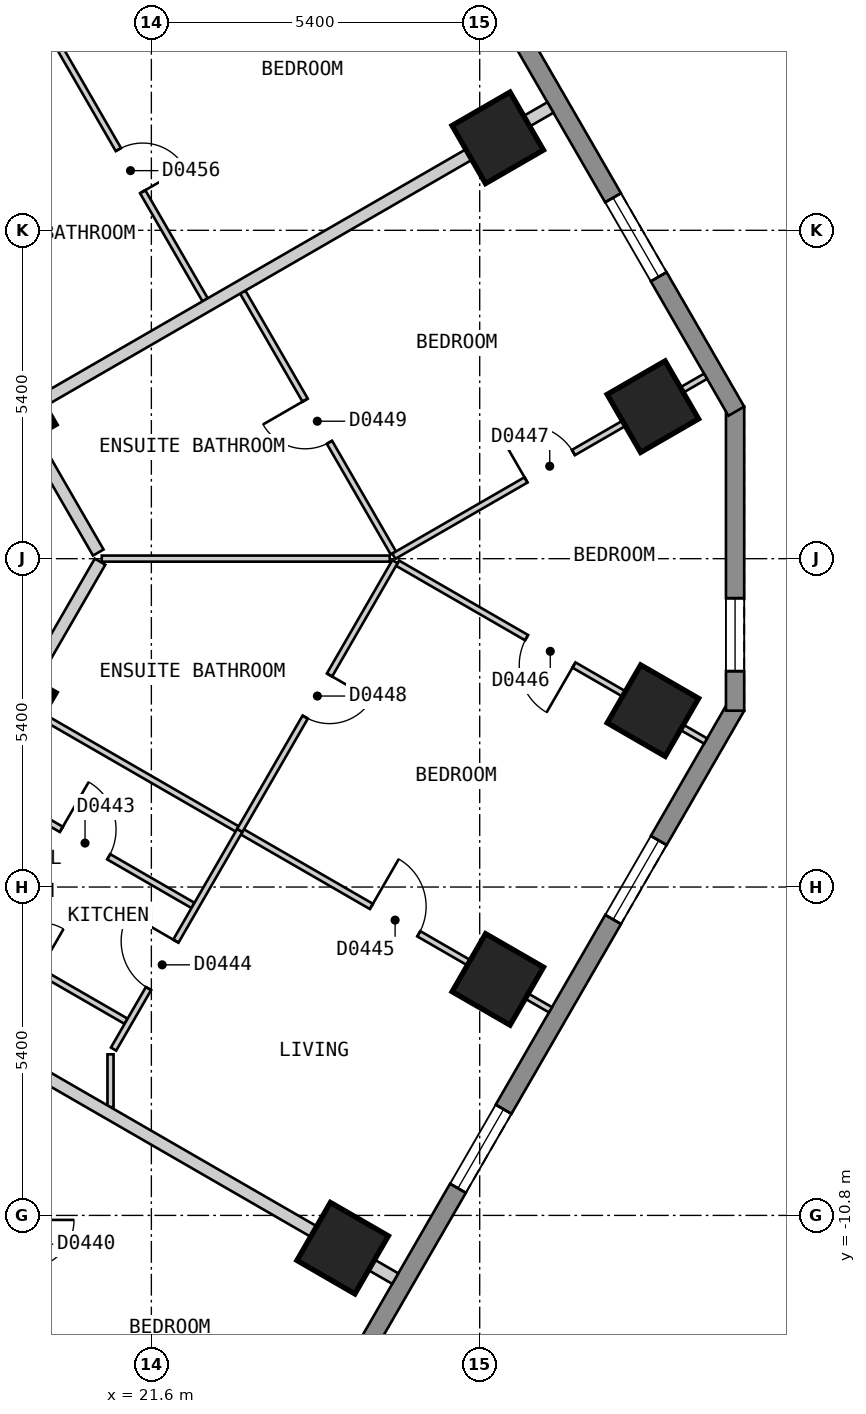
"""IFC4 building model, lengths in metres.
Left out: names, types, materials, properties, quantities, classifications, styles, units other than length and angle.
Written with IfcOpenShell. Run it as: python <this file> out.ifc"""

import sys

from ifc_helpers import new_model, si_unit, direction, frame, frame_2d, origin, origin_2d, place, context, subcontext, project, spatial, polyline, rectangle, outline, extrude, element, fill, save


model = new_model("IFC4")
c1 = context("Model", 3, precision=1e-05, world=origin(), true_north=direction((0.0, 1.0)))
c2 = subcontext(c1, "Body", "Model", "MODEL_VIEW")
j1 = project(units=[si_unit("LENGTHUNIT", "METRE"), si_unit("PLANEANGLEUNIT", "RADIAN")], contexts=[c1])
p1 = place(None, origin())
s1 = spatial("IfcSite", under=j1, at=p1, CompositionType="ELEMENT")
p2 = place(p1, origin())
s2 = spatial("IfcBuilding", under=s1, at=p2, CompositionType="ELEMENT")
p3 = place(p2, frame((0.0, 0.0, 32.4)))
s3 = spatial("IfcBuildingStorey", under=s2, at=p3, CompositionType="ELEMENT", Elevation=32.4)
for number, where, z_axis, x_axis in (
    (1, (24.746, -11.339, 0.0), (0.0, 0.0, 1.0), (0.5, 0.866, 0.0)),
    (2, (27.298, -6.919, 0.0), (0.0, 0.0, 1.0), (0.5, 0.866, 0.0)),
    (3, (29.849, -2.499, 0.0), (0.0, 0.0, 1.0), (0.5, 0.866, 0.0)),
    (4, (29.848, 2.5, 0.0), (0.0, 0.0, 1.0), (-0.5, 0.866, 0.0)),
    (5, (27.297, 6.921, 0.0), (0.0, 0.0, 1.0), (-0.5, 0.866, 0.0)),
):
    element("IfcColumn", number, at=place(p3, frame(where, z_axis=z_axis, x_axis=x_axis)), inside=s3, PredefinedType="COLUMN", context=c2, shape_type="SweptSolid", body=[
        extrude(rectangle(XDim=1.1, YDim=1.1, at=origin_2d()), origin(), (0.0, 0.0, 1.0), 3.0),
    ])
for number, where, z_axis, x_axis in (
    (6, (19.417, -2.369, 0.0), (0.0, 0.0, 1.0), (0.5, 0.866, 0.0)),
    (7, (19.416, 2.371, 0.0), (0.0, 0.0, 1.0), (-0.5, 0.866, 0.0)),
):
    element("IfcColumn", number, at=place(p3, frame(where, z_axis=z_axis, x_axis=x_axis)), inside=s3, PredefinedType="COLUMN", context=c2, shape_type="SweptSolid", body=[
        extrude(rectangle(XDim=0.9, YDim=0.9, at=origin_2d()), origin(), (0.0, 0.0, 1.0), 3.0),
    ])
p4 = place(p3, frame((17.71, -25.825, 0.0), z_axis=(0.0, 0.0, 1.0), x_axis=(0.500001938803, 0.866024284413, 0.0)))
e8 = element("IfcWall", 8, at=p4, inside=s3, PredefinedType="SOLIDWALL", context=c2, shape_type="SweptSolid", body=[
    extrude(outline(polyline([(0.0, -0.15), (27.02, -0.15), (26.94, 0.15), (0.08, 0.15), (0.0, -0.15)])), origin(), (0.0, 0.0, 1.0), 2.7),
])
p5 = place(p4, frame((2.553, 0.0, 0.15)))
e9 = element("IfcOpeningElement", 9, at=p5, cuts=e8, PredefinedType="OPENING", context=c2, shape_type="SweptSolid", body=[
    extrude(rectangle(XDim=1.5, YDim=2.1, at=frame_2d((0.75, 1.05))), frame((0.0, 0.16, 0.0), z_axis=(0.0, -1.0, 0.0), x_axis=(1.0, 0.0, 0.0)), (0.0, 0.0, 1.0), 0.32),
])
p6 = place(p4, frame((7.658, 0.0, 0.15)))
e10 = element("IfcOpeningElement", 10, at=p6, cuts=e8, PredefinedType="OPENING", context=c2, shape_type="SweptSolid", body=[
    extrude(rectangle(XDim=1.5, YDim=2.1, at=frame_2d((0.75, 1.05))), frame((0.0, 0.16, 0.0), z_axis=(0.0, -1.0, 0.0), x_axis=(1.0, 0.0, 0.0)), (0.0, 0.0, 1.0), 0.32),
])
p7 = place(p4, frame((12.761, 0.0, 0.15)))
e11 = element("IfcOpeningElement", 11, at=p7, cuts=e8, PredefinedType="OPENING", context=c2, shape_type="SweptSolid", body=[
    extrude(rectangle(XDim=1.5, YDim=2.1, at=frame_2d((0.75, 1.05))), frame((0.0, 0.16, 0.0), z_axis=(0.0, -1.0, 0.0), x_axis=(1.0, 0.0, 0.0)), (0.0, 0.0, 1.0), 0.32),
])
p8 = place(p4, frame((17.865, 0.0, 0.15)))
e12 = element("IfcOpeningElement", 12, at=p8, cuts=e8, PredefinedType="OPENING", context=c2, shape_type="SweptSolid", body=[
    extrude(rectangle(XDim=1.5, YDim=2.1, at=frame_2d((0.75, 1.05))), frame((0.0, 0.16, 0.0), z_axis=(0.0, -1.0, 0.0), x_axis=(1.0, 0.0, 0.0)), (0.0, 0.0, 1.0), 0.32),
])
p9 = place(p4, frame((22.969, 0.0, 0.15)))
e13 = element("IfcOpeningElement", 13, at=p9, cuts=e8, PredefinedType="OPENING", context=c2, shape_type="SweptSolid", body=[
    extrude(rectangle(XDim=1.5, YDim=2.1, at=frame_2d((0.75, 1.05))), frame((0.0, 0.16, 0.0), z_axis=(0.0, -1.0, 0.0), x_axis=(1.0, 0.0, 0.0)), (0.0, 0.0, 1.0), 0.32),
])
p10 = place(p3, frame((31.2, -2.5, 0.0), z_axis=(0.0, 0.0, 1.0), x_axis=(0.0, 1.0, 0.0)))
e14 = element("IfcWall", 14, at=p10, inside=s3, PredefinedType="SOLIDWALL", context=c2, shape_type="SweptSolid", body=[
    extrude(outline(polyline([(0.0, -0.15), (5.0, -0.15), (4.92, 0.15), (0.08, 0.15), (0.0, -0.15)])), origin(), (0.0, 0.0, 1.0), 2.7),
])
p11 = place(p10, frame((0.65, 0.0, 0.15)))
e15 = element("IfcOpeningElement", 15, at=p11, cuts=e14, PredefinedType="OPENING", context=c2, shape_type="SweptSolid", body=[
    extrude(rectangle(XDim=1.2, YDim=2.1, at=frame_2d((0.6, 1.05))), frame((0.0, 0.16, 0.0), z_axis=(0.0, -1.0, 0.0), x_axis=(1.0, 0.0, 0.0)), (0.0, 0.0, 1.0), 0.32),
])
p12 = place(p3, frame((31.22, 2.425, 0.0), z_axis=(0.0, 0.0, 1.0), x_axis=(-0.500001938803, 0.866024284413, 0.0)))
e16 = element("IfcWall", 16, at=p12, inside=s3, PredefinedType="SOLIDWALL", context=c2, shape_type="SweptSolid", body=[
    extrude(outline(polyline([(0.0, -0.15), (27.02, -0.15), (26.94, 0.15), (0.08, 0.15), (0.0, -0.15)])), origin(), (0.0, 0.0, 1.0), 2.7),
])
p13 = place(p12, frame((2.553, 0.0, 0.15)))
e17 = element("IfcOpeningElement", 17, at=p13, cuts=e16, PredefinedType="OPENING", context=c2, shape_type="SweptSolid", body=[
    extrude(rectangle(XDim=1.5, YDim=2.1, at=frame_2d((0.75, 1.05))), frame((0.0, 0.16, 0.0), z_axis=(0.0, -1.0, 0.0), x_axis=(1.0, 0.0, 0.0)), (0.0, 0.0, 1.0), 0.32),
])
p14 = place(p12, frame((7.657, 0.0, 0.15)))
e18 = element("IfcOpeningElement", 18, at=p14, cuts=e16, PredefinedType="OPENING", context=c2, shape_type="SweptSolid", body=[
    extrude(rectangle(XDim=1.5, YDim=2.1, at=frame_2d((0.75, 1.05))), frame((0.0, 0.16, 0.0), z_axis=(0.0, -1.0, 0.0), x_axis=(1.0, 0.0, 0.0)), (0.0, 0.0, 1.0), 0.32),
])
p15 = place(p12, frame((12.761, 0.0, 0.15)))
e19 = element("IfcOpeningElement", 19, at=p15, cuts=e16, PredefinedType="OPENING", context=c2, shape_type="SweptSolid", body=[
    extrude(rectangle(XDim=1.5, YDim=2.1, at=frame_2d((0.75, 1.05))), frame((0.0, 0.16, 0.0), z_axis=(0.0, -1.0, 0.0), x_axis=(1.0, 0.0, 0.0)), (0.0, 0.0, 1.0), 0.32),
])
p16 = place(p12, frame((17.865, 0.0, 0.15)))
e20 = element("IfcOpeningElement", 20, at=p16, cuts=e16, PredefinedType="OPENING", context=c2, shape_type="SweptSolid", body=[
    extrude(rectangle(XDim=1.5, YDim=2.1, at=frame_2d((0.75, 1.05))), frame((0.0, 0.16, 0.0), z_axis=(0.0, -1.0, 0.0), x_axis=(1.0, 0.0, 0.0)), (0.0, 0.0, 1.0), 0.32),
])
p17 = place(p12, frame((22.969, 0.0, 0.15)))
e21 = element("IfcOpeningElement", 21, at=p17, cuts=e16, PredefinedType="OPENING", context=c2, shape_type="SweptSolid", body=[
    extrude(rectangle(XDim=1.5, YDim=2.1, at=frame_2d((0.75, 1.05))), frame((0.0, 0.16, 0.0), z_axis=(0.0, -1.0, 0.0), x_axis=(1.0, 0.0, 0.0)), (0.0, 0.0, 1.0), 0.32),
])
p18 = place(p3, frame((10.45, 17.9, 0.0), z_axis=(0.0, 0.0, 1.0), x_axis=(0.500034352617, -0.866005569383, 0.0)))
e22 = element("IfcWall", 22, at=p18, inside=s3, PredefinedType="PARTITIONING", context=c2, shape_type="SweptSolid", body=[
    extrude(rectangle(XDim=20.553, YDim=0.2, at=frame_2d((10.276, 0.0))), origin(), (0.0, 0.0, 1.0), 2.7),
])
p19 = place(p18, frame((9.775, 0.0, 0.0)))
e23 = element("IfcOpeningElement", 23, at=p19, cuts=e22, PredefinedType="OPENING", context=c2, shape_type="SweptSolid", body=[
    extrude(rectangle(XDim=1.0, YDim=2.1, at=frame_2d((0.5, 1.05))), frame((0.0, 0.11, 0.0), z_axis=(0.0, -1.0, 0.0), x_axis=(1.0, 0.0, 0.0)), (0.0, 0.0, 1.0), 0.22),
])
p20 = place(p18, frame((0.852, 0.0, 0.0)))
e24 = element("IfcOpeningElement", 24, at=p20, cuts=e22, PredefinedType="OPENING", context=c2, shape_type="SweptSolid", body=[
    extrude(rectangle(XDim=0.8, YDim=2.1, at=frame_2d((0.4, 1.05))), frame((0.0, 0.11, 0.0), z_axis=(0.0, -1.0, 0.0), x_axis=(1.0, 0.0, 0.0)), (0.0, 0.0, 1.0), 0.22),
])
p21 = place(p3, frame((15.707, -8.794, 0.0), z_axis=(0.0, 0.0, 1.0), x_axis=(0.500016151272, 0.866016078642, 0.0)))
e25 = element("IfcWall", 25, at=p21, inside=s3, PredefinedType="PARTITIONING", context=c2, shape_type="SweptSolid", body=[
    extrude(rectangle(XDim=10.098, YDim=0.2, at=frame_2d((5.049, 0.0))), origin(), (0.0, 0.0, 1.0), 2.7),
])
p22 = place(p21, frame((4.367, 0.0, 0.0)))
e26 = element("IfcOpeningElement", 26, at=p22, cuts=e25, PredefinedType="OPENING", context=c2, shape_type="SweptSolid", body=[
    extrude(rectangle(XDim=1.0, YDim=2.1, at=frame_2d((0.5, 1.05))), frame((0.0, 0.11, 0.0), z_axis=(0.0, -1.0, 0.0), x_axis=(1.0, 0.0, 0.0)), (0.0, 0.0, 1.0), 0.22),
])
p23 = place(p3, frame((20.006, 8.548, 0.0), z_axis=(0.0, 0.0, 1.0), x_axis=(0.500055121407, -0.865993577086, 0.0)))
e27 = element("IfcWall", 27, at=p23, inside=s3, PredefinedType="PARTITIONING", context=c2, shape_type="SweptSolid", body=[
    extrude(rectangle(XDim=4.955, YDim=0.1, at=frame_2d((2.478, 0.0))), origin(), (0.0, 0.0, 1.0), 2.7),
])
p24 = place(p23, frame((2.102, 0.0, 0.0)))
e28 = element("IfcOpeningElement", 28, at=p24, cuts=e27, PredefinedType="OPENING", context=c2, shape_type="SweptSolid", body=[
    extrude(rectangle(XDim=0.8, YDim=2.1, at=frame_2d((0.4, 1.05))), frame((0.0, 0.06, 0.0), z_axis=(0.0, -1.0, 0.0), x_axis=(1.0, 0.0, 0.0)), (0.0, 0.0, 1.0), 0.12),
])
p25 = place(p3, frame((23.103, 4.384, 0.0), z_axis=(0.0, 0.0, 1.0), x_axis=(0.500029609304, -0.86600830817, 0.0)))
e29 = element("IfcWall", 29, at=p25, inside=s3, PredefinedType="PARTITIONING", context=c2, shape_type="SweptSolid", body=[
    extrude(rectangle(XDim=4.954, YDim=0.1, at=frame_2d((2.477, 0.0))), origin(), (0.0, 0.0, 1.0), 2.7),
])
p26 = place(p25, frame((2.052, 0.0, 0.0)))
e30 = element("IfcOpeningElement", 30, at=p26, cuts=e29, PredefinedType="OPENING", context=c2, shape_type="SweptSolid", body=[
    extrude(rectangle(XDim=0.8, YDim=2.1, at=frame_2d((0.4, 1.05))), frame((0.0, 0.06, 0.0), z_axis=(0.0, -1.0, 0.0), x_axis=(1.0, 0.0, 0.0)), (0.0, 0.0, 1.0), 0.12),
])
p27 = place(p3, frame((17.677, -5.582, 0.0), z_axis=(0.0, 0.0, 1.0), x_axis=(0.866015917575, -0.500016430238, 0.0)))
e31 = element("IfcWall", 31, at=p27, inside=s3, PredefinedType="PARTITIONING", context=c2, shape_type="SweptSolid", body=[
    extrude(rectangle(XDim=4.05, YDim=0.1, at=frame_2d((2.025, 0.0))), origin(), (0.0, 0.0, 1.0), 2.7),
])
p28 = place(p27, frame((1.6, 0.0, 0.0)))
e32 = element("IfcOpeningElement", 32, at=p28, cuts=e31, PredefinedType="OPENING", context=c2, shape_type="SweptSolid", body=[
    extrude(rectangle(XDim=0.8, YDim=2.1, at=frame_2d((0.4, 1.05))), frame((0.0, 0.06, 0.0), z_axis=(0.0, -1.0, 0.0), x_axis=(1.0, 0.0, 0.0)), (0.0, 0.0, 1.0), 0.12),
])
p29 = place(p3, frame((18.777, -3.677, 0.0), z_axis=(0.0, 0.0, 1.0), x_axis=(0.866000843773, -0.500042536776, 0.0)))
e33 = element("IfcWall", 33, at=p29, inside=s3, PredefinedType="PARTITIONING", context=c2, shape_type="SweptSolid", body=[
    extrude(rectangle(XDim=4.05, YDim=0.1, at=frame_2d((2.025, 0.0))), origin(), (0.0, 0.0, 1.0), 2.7),
])
p30 = place(p29, frame((1.55, 0.0, 0.0)))
e34 = element("IfcOpeningElement", 34, at=p30, cuts=e33, PredefinedType="OPENING", context=c2, shape_type="SweptSolid", body=[
    extrude(rectangle(XDim=0.9, YDim=2.1, at=frame_2d((0.45, 1.05))), frame((0.0, 0.06, 0.0), z_axis=(0.0, -1.0, 0.0), x_axis=(1.0, 0.0, 0.0)), (0.0, 0.0, 1.0), 0.12),
])
p31 = place(p3, frame((19.503, -2.419, 0.0), z_axis=(0.0, 0.0, 1.0), x_axis=(0.866047370643, -0.499961950354, 0.0)))
e35 = element("IfcWall", 35, at=p31, inside=s3, PredefinedType="PARTITIONING", context=c2, shape_type="SweptSolid", body=[
    extrude(rectangle(XDim=10.001, YDim=0.1, at=frame_2d((5.0, 0.0))), origin(), (0.0, 0.0, 1.0), 2.7),
])
p32 = place(p31, frame((6.6, 0.0, 0.0)))
e36 = element("IfcOpeningElement", 36, at=p32, cuts=e35, PredefinedType="OPENING", context=c2, shape_type="SweptSolid", body=[
    extrude(rectangle(XDim=0.9, YDim=2.1, at=frame_2d((0.45, 1.05))), frame((0.0, 0.06, 0.0), z_axis=(0.0, -1.0, 0.0), x_axis=(1.0, 0.0, 0.0)), (0.0, 0.0, 1.0), 0.12),
])
p33 = place(p3, frame((25.649, -0.074, 0.0), z_axis=(0.0, 0.0, 1.0), x_axis=(0.866059819573, -0.499940385368, 0.0)))
e37 = element("IfcWall", 37, at=p33, inside=s3, PredefinedType="PARTITIONING", context=c2, shape_type="SweptSolid", body=[
    extrude(rectangle(XDim=5.851, YDim=0.1, at=frame_2d((2.925, 0.0))), origin(), (0.0, 0.0, 1.0), 2.7),
])
p34 = place(p33, frame((2.45, 0.0, 0.0)))
e38 = element("IfcOpeningElement", 38, at=p34, cuts=e37, PredefinedType="OPENING", context=c2, shape_type="SweptSolid", body=[
    extrude(rectangle(XDim=0.9, YDim=2.1, at=frame_2d((0.45, 1.05))), frame((0.0, 0.06, 0.0), z_axis=(0.0, -1.0, 0.0), x_axis=(1.0, 0.0, 0.0)), (0.0, 0.0, 1.0), 0.12),
])
p35 = place(p3, frame((20.784, 0.001, 0.0), z_axis=(0.0, 0.0, 1.0), x_axis=(1.0, 0.0, 0.0)))
e39 = element("IfcWall", 39, at=p35, inside=s3, PredefinedType="PARTITIONING", context=c2, shape_type="SweptSolid", body=[
    extrude(rectangle(XDim=4.736, YDim=0.1, at=frame_2d((2.368, 0.0))), origin(), (0.0, 0.0, 1.0), 2.7),
])
p36 = place(p3, frame((20.978, -8.065, 0.0), z_axis=(0.0, 0.0, 1.0), x_axis=(0.499965068118, 0.866045570776, 0.0)))
e40 = element("IfcWall", 40, at=p36, inside=s3, PredefinedType="PARTITIONING", context=c2, shape_type="SweptSolid", body=[
    extrude(rectangle(XDim=4.152, YDim=0.1, at=frame_2d((2.076, 0.0))), origin(), (0.0, 0.0, 1.0), 2.7),
])
p37 = place(p36, frame((1.15, 0.0, 0.0)))
e41 = element("IfcOpeningElement", 41, at=p37, cuts=e40, PredefinedType="OPENING", context=c2, shape_type="SweptSolid", body=[
    extrude(rectangle(XDim=0.9, YDim=2.1, at=frame_2d((0.45, 1.05))), frame((0.0, 0.06, 0.0), z_axis=(0.0, -1.0, 0.0), x_axis=(1.0, 0.0, 0.0)), (0.0, 0.0, 1.0), 0.12),
])
p38 = place(p3, frame((20.928, -9.02, 0.0), z_axis=(0.0, 0.0, 1.0), x_axis=(0.0, 1.0, 0.0)))
e42 = element("IfcWall", 42, at=p38, inside=s3, PredefinedType="PARTITIONING", context=c2, shape_type="SweptSolid", body=[
    extrude(rectangle(XDim=0.869, YDim=0.1, at=frame_2d((0.435, 0.0))), origin(), (0.0, 0.0, 1.0), 2.7),
])
p39 = place(p3, frame((25.588, 0.041, 0.0), z_axis=(0.0, 0.0, 1.0), x_axis=(0.866113484451, 0.499847408768, 0.0)))
e43 = element("IfcWall", 43, at=p39, inside=s3, PredefinedType="PARTITIONING", context=c2, shape_type="SweptSolid", body=[
    extrude(rectangle(XDim=5.92, YDim=0.1, at=frame_2d((2.96, 0.0))), origin(), (0.0, 0.0, 1.0), 2.7),
])
p40 = place(p39, frame((2.51, 0.0, 0.0)))
e44 = element("IfcOpeningElement", 44, at=p40, cuts=e43, PredefinedType="OPENING", context=c2, shape_type="SweptSolid", body=[
    extrude(rectangle(XDim=0.9, YDim=2.1, at=frame_2d((0.45, 1.05))), frame((0.0, 0.06, 0.0), z_axis=(0.0, -1.0, 0.0), x_axis=(1.0, 0.0, 0.0)), (0.0, 0.0, 1.0), 0.12),
])
p41 = place(p3, frame((16.95, 6.841, 0.0), z_axis=(0.0, 0.0, 1.0), x_axis=(0.866022959057, 0.500004234368, 0.0)))
e45 = element("IfcWall", 45, at=p41, inside=s3, PredefinedType="PARTITIONING", context=c2, shape_type="SweptSolid", body=[
    extrude(rectangle(XDim=10.0, YDim=0.1, at=frame_2d((5.0, 0.0))), origin(), (0.0, 0.0, 1.0), 2.7),
])
p42 = place(p41, frame((4.795, 0.0, 0.0)))
e46 = element("IfcOpeningElement", 46, at=p42, cuts=e45, PredefinedType="OPENING", context=c2, shape_type="SweptSolid", body=[
    extrude(rectangle(XDim=0.9, YDim=2.1, at=frame_2d((0.45, 1.05))), frame((0.0, 0.06, 0.0), z_axis=(0.0, -1.0, 0.0), x_axis=(1.0, 0.0, 0.0)), (0.0, 0.0, 1.0), 0.12),
])
p43 = place(p3, frame((16.951, -6.839, 0.0), z_axis=(0.0, 0.0, 1.0), x_axis=(0.866022959057, -0.500004234368, 0.0)))
e47 = element("IfcWall", 47, at=p43, inside=s3, PredefinedType="PARTITIONING", context=c2, shape_type="SweptSolid", body=[
    extrude(rectangle(XDim=10.0, YDim=0.2, at=frame_2d((5.0, 0.0))), origin(), (0.0, 0.0, 1.0), 2.7),
])
p44 = place(p3, frame((19.503, 2.421, 0.0), z_axis=(0.0, 0.0, 1.0), x_axis=(0.866065245018, 0.499930986609, 0.0)))
e48 = element("IfcWall", 48, at=p44, inside=s3, PredefinedType="PARTITIONING", context=c2, shape_type="SweptSolid", body=[
    extrude(rectangle(XDim=10.0, YDim=0.2, at=frame_2d((5.0, 0.0))), origin(), (0.0, 0.0, 1.0), 2.7),
])
p45 = place(p3, frame((23.054, -4.469, 0.0), z_axis=(0.0, 0.0, 1.0), x_axis=(0.500023345639, 0.866011924754, 0.0)))
e49 = element("IfcWall", 49, at=p45, inside=s3, PredefinedType="PARTITIONING", context=c2, shape_type="SweptSolid", body=[
    extrude(rectangle(XDim=5.104, YDim=0.1, at=frame_2d((2.552, 0.0))), origin(), (0.0, 0.0, 1.0), 2.7),
])
p46 = place(p45, frame((2.152, 0.0, 0.0)))
e50 = element("IfcOpeningElement", 50, at=p46, cuts=e49, PredefinedType="OPENING", context=c2, shape_type="SweptSolid", body=[
    extrude(rectangle(XDim=0.8, YDim=2.1, at=frame_2d((0.4, 1.05))), frame((0.0, 0.06, 0.0), z_axis=(0.0, -1.0, 0.0), x_axis=(1.0, 0.0, 0.0)), (0.0, 0.0, 1.0), 0.12),
])
p47 = place(p8, origin())
e51 = element("IfcWindow", 51, at=p47, inside=s3, PartitioningType="SINGLE_PANEL", PredefinedType="WINDOW", context=c2, shape_type="SweptSolid", body=[
    extrude(rectangle(XDim=1.5, YDim=2.1, at=frame_2d((0.75, 1.05))), frame((0.0, 0.03, 0.0), z_axis=(0.0, -1.0, 0.0), x_axis=(1.0, 0.0, 0.0)), (0.0, 0.0, 1.0), 0.06),
])
fill(e12, e51)
p48 = place(p9, origin())
e52 = element("IfcWindow", 52, at=p48, inside=s3, PartitioningType="SINGLE_PANEL", PredefinedType="WINDOW", context=c2, shape_type="SweptSolid", body=[
    extrude(rectangle(XDim=1.5, YDim=2.1, at=frame_2d((0.75, 1.05))), frame((0.0, 0.03, 0.0), z_axis=(0.0, -1.0, 0.0), x_axis=(1.0, 0.0, 0.0)), (0.0, 0.0, 1.0), 0.06),
])
fill(e13, e52)
p49 = place(p11, origin())
e53 = element("IfcWindow", 53, at=p49, inside=s3, PartitioningType="SINGLE_PANEL", PredefinedType="WINDOW", context=c2, shape_type="SweptSolid", body=[
    extrude(rectangle(XDim=1.2, YDim=2.1, at=frame_2d((0.6, 1.05))), frame((0.0, 0.03, 0.0), z_axis=(0.0, -1.0, 0.0), x_axis=(1.0, 0.0, 0.0)), (0.0, 0.0, 1.0), 0.06),
])
fill(e15, e53)
p50 = place(p13, origin())
e54 = element("IfcWindow", 54, at=p50, inside=s3, PartitioningType="SINGLE_PANEL", PredefinedType="WINDOW", context=c2, shape_type="SweptSolid", body=[
    extrude(rectangle(XDim=1.5, YDim=2.1, at=frame_2d((0.75, 1.05))), frame((0.0, 0.03, 0.0), z_axis=(0.0, -1.0, 0.0), x_axis=(1.0, 0.0, 0.0)), (0.0, 0.0, 1.0), 0.06),
])
fill(e17, e54)
p51 = place(p30, origin())
e55 = element("IfcDoor", 55, at=p51, inside=s3, OperationType="SINGLE_SWING_LEFT", PredefinedType="DOOR", context=c2, shape_type="SweptSolid", body=[
    extrude(rectangle(XDim=0.9, YDim=2.1, at=frame_2d((0.45, 1.05))), frame((0.0, 0.025, 0.0), z_axis=(0.0, -1.0, 0.0), x_axis=(1.0, 0.0, 0.0)), (0.0, 0.0, 1.0), 0.05),
])
fill(e34, e55)
p52 = place(p37, origin())
e56 = element("IfcDoor", 56, at=p52, inside=s3, OperationType="SINGLE_SWING_RIGHT", PredefinedType="DOOR", context=c2, shape_type="SweptSolid", body=[
    extrude(rectangle(XDim=0.9, YDim=2.1, at=frame_2d((0.45, 1.05))), frame((0.0, 0.025, 0.0), z_axis=(0.0, -1.0, 0.0), x_axis=(1.0, 0.0, 0.0)), (0.0, 0.0, 1.0), 0.05),
])
fill(e41, e56)
p53 = place(p32, origin())
e57 = element("IfcDoor", 57, at=p53, inside=s3, OperationType="SINGLE_SWING_LEFT", PredefinedType="DOOR", context=c2, shape_type="SweptSolid", body=[
    extrude(rectangle(XDim=0.9, YDim=2.1, at=frame_2d((0.45, 1.05))), frame((0.0, 0.025, 0.0), z_axis=(0.0, -1.0, 0.0), x_axis=(1.0, 0.0, 0.0)), (0.0, 0.0, 1.0), 0.05),
])
fill(e36, e57)
p54 = place(p34, origin())
e58 = element("IfcDoor", 58, at=p54, inside=s3, OperationType="SINGLE_SWING_RIGHT", PredefinedType="DOOR", context=c2, shape_type="SweptSolid", body=[
    extrude(rectangle(XDim=0.9, YDim=2.1, at=frame_2d((0.45, 1.05))), frame((0.0, 0.025, 0.0), z_axis=(0.0, -1.0, 0.0), x_axis=(1.0, 0.0, 0.0)), (0.0, 0.0, 1.0), 0.05),
])
fill(e38, e58)
p55 = place(p40, origin())
e59 = element("IfcDoor", 59, at=p55, inside=s3, OperationType="SINGLE_SWING_LEFT", PredefinedType="DOOR", context=c2, shape_type="SweptSolid", body=[
    extrude(rectangle(XDim=0.9, YDim=2.1, at=frame_2d((0.45, 1.05))), frame((0.0, 0.025, 0.0), z_axis=(0.0, -1.0, 0.0), x_axis=(1.0, 0.0, 0.0)), (0.0, 0.0, 1.0), 0.05),
])
fill(e44, e59)
p56 = place(p46, origin())
e60 = element("IfcDoor", 60, at=p56, inside=s3, OperationType="SINGLE_SWING_RIGHT", PredefinedType="DOOR", context=c2, shape_type="SweptSolid", body=[
    extrude(rectangle(XDim=0.8, YDim=2.1, at=frame_2d((0.4, 1.05))), frame((0.0, 0.025, 0.0), z_axis=(0.0, -1.0, 0.0), x_axis=(1.0, 0.0, 0.0)), (0.0, 0.0, 1.0), 0.05),
])
fill(e50, e60)
p57 = place(p26, origin())
e61 = element("IfcDoor", 61, at=p57, inside=s3, OperationType="SINGLE_SWING_LEFT", PredefinedType="DOOR", context=c2, shape_type="SweptSolid", body=[
    extrude(rectangle(XDim=0.8, YDim=2.1, at=frame_2d((0.4, 1.05))), frame((0.0, 0.025, 0.0), z_axis=(0.0, -1.0, 0.0), x_axis=(1.0, 0.0, 0.0)), (0.0, 0.0, 1.0), 0.05),
])
fill(e30, e61)
p58 = place(p24, origin())
e62 = element("IfcDoor", 62, at=p58, inside=s3, OperationType="SINGLE_SWING_RIGHT", PredefinedType="DOOR", context=c2, shape_type="SweptSolid", body=[
    extrude(rectangle(XDim=0.8, YDim=2.1, at=frame_2d((0.4, 1.05))), frame((0.0, 0.025, 0.0), z_axis=(0.0, -1.0, 0.0), x_axis=(1.0, 0.0, 0.0)), (0.0, 0.0, 1.0), 0.05),
])
fill(e28, e62)
save(model, sys.argv[1])
